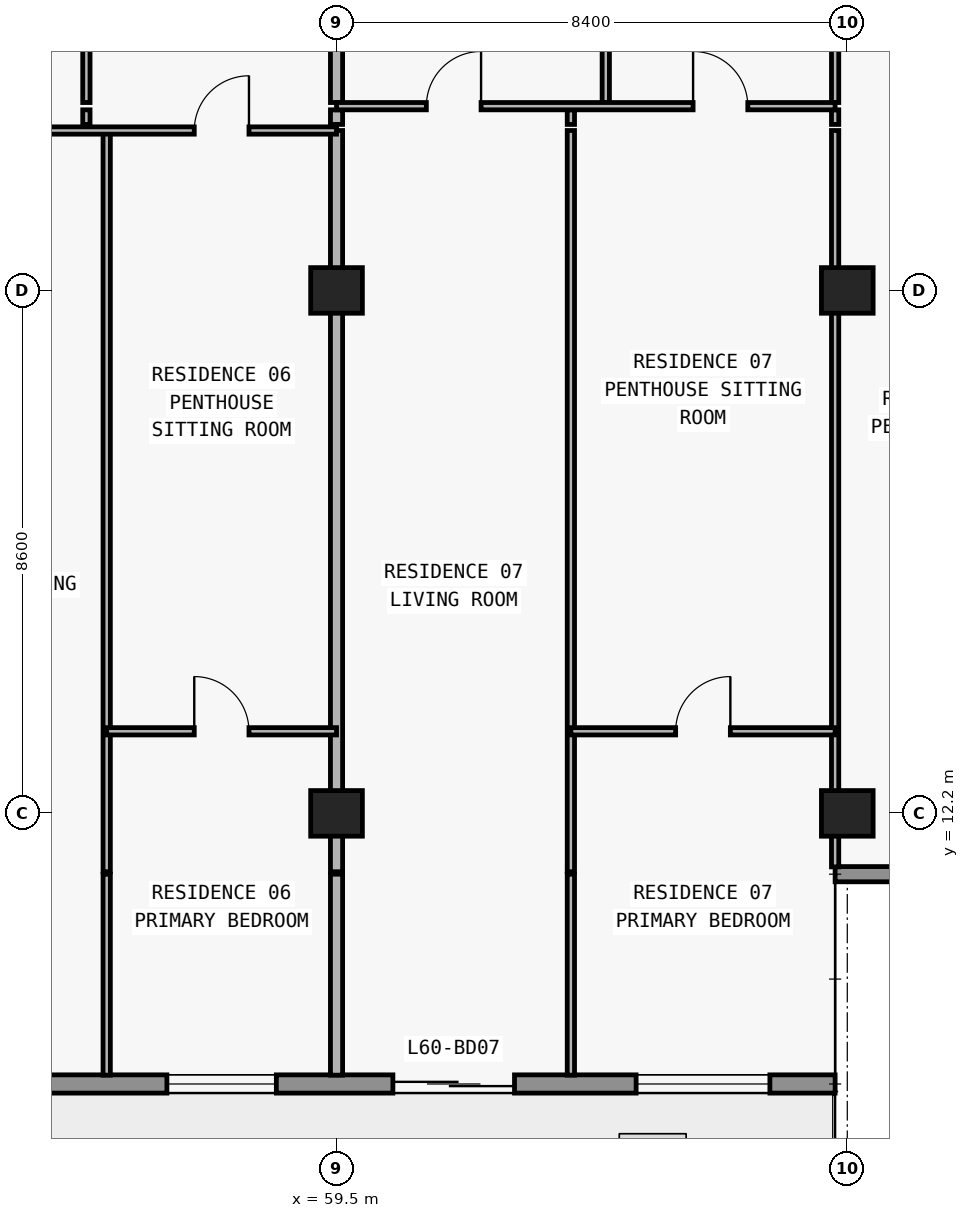
"""IFC4 building model, lengths in metres.
Left out: names, types, materials, properties, quantities, classifications, styles, units other than length and angle.
Written with IfcOpenShell. Run it as: python <this file> out.ifc"""

import sys

from ifc_helpers import new_model, si_unit, direction, frame, frame_2d, origin, origin_2d, place, context, subcontext, project, spatial, rectangle, extrude, element, fill, save


model = new_model("IFC4")
c1 = context("Model", 3, precision=1e-05, world=origin(), true_north=direction((0.0, 1.0)))
c2 = subcontext(c1, "Body", "Model", "MODEL_VIEW")
j1 = project(units=[si_unit("LENGTHUNIT", "METRE"), si_unit("PLANEANGLEUNIT", "RADIAN")], contexts=[c1])
p1 = place(None, origin())
s1 = spatial("IfcSite", under=j1, at=p1, CompositionType="ELEMENT")
p2 = place(p1, origin())
s2 = spatial("IfcBuilding", under=s1, at=p2, CompositionType="ELEMENT")
p3 = place(p2, frame((0.0, 0.0, 214.8)))
s3 = spatial("IfcBuildingStorey", under=s2, at=p3, CompositionType="ELEMENT", Elevation=214.8)
for number, where, z_axis, x_axis in (
    (1, (59.5, 12.2, 0.0), (0.0, 0.0, 1.0), (1.0, 0.0, 0.0)),
    (2, (67.9, 12.2, 0.0), (0.0, 0.0, 1.0), (1.0, 0.0, 0.0)),
    (3, (59.5, 20.8, 0.0), (0.0, 0.0, 1.0), (1.0, 0.0, 0.0)),
    (4, (67.9, 20.8, 0.0), (0.0, 0.0, 1.0), (1.0, 0.0, 0.0)),
):
    element("IfcColumn", number, at=place(p3, frame(where, z_axis=z_axis, x_axis=x_axis)), inside=s3, PredefinedType="COLUMN", context=c2, shape_type="SweptSolid", body=[
        extrude(rectangle(XDim=0.85, YDim=0.75, at=origin_2d()), origin(), (0.0, 0.0, 1.0), 3.05),
    ])
p4 = place(p3, frame((67.7, 7.75, 0.0), z_axis=(0.0, 0.0, 1.0), x_axis=(-1.0, 0.0, 0.0)))
e5 = element("IfcWall", 5, at=p4, inside=s3, PredefinedType="STANDARD", context=c2, shape_type="SweptSolid", body=[
    extrude(rectangle(XDim=57.6, YDim=0.3, at=frame_2d((28.8, 0.0))), origin(), (0.0, 0.0, 1.0), 3.05),
])
p5 = place(p4, frame((54.673, 0.0, 0.0)))
e6 = element("IfcOpeningElement", 6, at=p5, cuts=e5, PredefinedType="OPENING", context=c2, shape_type="SweptSolid", body=[
    extrude(rectangle(XDim=2.0, YDim=2.3, at=frame_2d((1.0, 1.15))), frame((0.0, 0.16, 0.0), z_axis=(0.0, -1.0, 0.0), x_axis=(1.0, 0.0, 0.0)), (0.0, 0.0, 1.0), 0.32),
])
p6 = place(p4, frame((50.473, 0.0, 0.85)))
e7 = element("IfcOpeningElement", 7, at=p6, cuts=e5, PredefinedType="OPENING", context=c2, shape_type="SweptSolid", body=[
    extrude(rectangle(XDim=2.2, YDim=1.55, at=frame_2d((1.1, 0.775))), frame((0.0, 0.16, 0.0), z_axis=(0.0, -1.0, 0.0), x_axis=(1.0, 0.0, 0.0)), (0.0, 0.0, 1.0), 0.32),
])
p7 = place(p4, frame((46.09, 0.0, 0.0)))
e8 = element("IfcOpeningElement", 8, at=p7, cuts=e5, PredefinedType="OPENING", context=c2, shape_type="SweptSolid", body=[
    extrude(rectangle(XDim=2.0, YDim=2.3, at=frame_2d((1.0, 1.15))), frame((0.0, 0.16, 0.0), z_axis=(0.0, -1.0, 0.0), x_axis=(1.0, 0.0, 0.0)), (0.0, 0.0, 1.0), 0.32),
])
p8 = place(p4, frame((41.99, 0.0, 0.85)))
e9 = element("IfcOpeningElement", 9, at=p8, cuts=e5, PredefinedType="OPENING", context=c2, shape_type="SweptSolid", body=[
    extrude(rectangle(XDim=1.8, YDim=1.55, at=frame_2d((0.9, 0.775))), frame((0.0, 0.16, 0.0), z_axis=(0.0, -1.0, 0.0), x_axis=(1.0, 0.0, 0.0)), (0.0, 0.0, 1.0), 0.32),
])
p9 = place(p4, frame((38.026, 0.0, 0.0)))
e10 = element("IfcOpeningElement", 10, at=p9, cuts=e5, PredefinedType="OPENING", context=c2, shape_type="SweptSolid", body=[
    extrude(rectangle(XDim=2.0, YDim=2.3, at=frame_2d((1.0, 1.15))), frame((0.0, 0.16, 0.0), z_axis=(0.0, -1.0, 0.0), x_axis=(1.0, 0.0, 0.0)), (0.0, 0.0, 1.0), 0.32),
])
p10 = place(p4, frame((33.726, 0.0, 0.85)))
e11 = element("IfcOpeningElement", 11, at=p10, cuts=e5, PredefinedType="OPENING", context=c2, shape_type="SweptSolid", body=[
    extrude(rectangle(XDim=2.2, YDim=1.55, at=frame_2d((1.1, 0.775))), frame((0.0, 0.16, 0.0), z_axis=(0.0, -1.0, 0.0), x_axis=(1.0, 0.0, 0.0)), (0.0, 0.0, 1.0), 0.32),
])
p11 = place(p4, frame((29.51, 0.0, 0.0)))
e12 = element("IfcOpeningElement", 12, at=p11, cuts=e5, PredefinedType="OPENING", context=c2, shape_type="SweptSolid", body=[
    extrude(rectangle(XDim=2.0, YDim=2.3, at=frame_2d((1.0, 1.15))), frame((0.0, 0.16, 0.0), z_axis=(0.0, -1.0, 0.0), x_axis=(1.0, 0.0, 0.0)), (0.0, 0.0, 1.0), 0.32),
])
p12 = place(p4, frame((25.81, 0.0, 0.85)))
e13 = element("IfcOpeningElement", 13, at=p12, cuts=e5, PredefinedType="OPENING", context=c2, shape_type="SweptSolid", body=[
    extrude(rectangle(XDim=1.8, YDim=1.55, at=frame_2d((0.9, 0.775))), frame((0.0, 0.16, 0.0), z_axis=(0.0, -1.0, 0.0), x_axis=(1.0, 0.0, 0.0)), (0.0, 0.0, 1.0), 0.32),
])
p13 = place(p4, frame((22.026, 0.0, 0.0)))
e14 = element("IfcOpeningElement", 14, at=p13, cuts=e5, PredefinedType="OPENING", context=c2, shape_type="SweptSolid", body=[
    extrude(rectangle(XDim=2.0, YDim=2.3, at=frame_2d((1.0, 1.15))), frame((0.0, 0.16, 0.0), z_axis=(0.0, -1.0, 0.0), x_axis=(1.0, 0.0, 0.0)), (0.0, 0.0, 1.0), 0.32),
])
p14 = place(p4, frame((17.726, 0.0, 0.85)))
e15 = element("IfcOpeningElement", 15, at=p14, cuts=e5, PredefinedType="OPENING", context=c2, shape_type="SweptSolid", body=[
    extrude(rectangle(XDim=2.2, YDim=1.55, at=frame_2d((1.1, 0.775))), frame((0.0, 0.16, 0.0), z_axis=(0.0, -1.0, 0.0), x_axis=(1.0, 0.0, 0.0)), (0.0, 0.0, 1.0), 0.32),
])
p15 = place(p4, frame((13.29, 0.0, 0.0)))
e16 = element("IfcOpeningElement", 16, at=p15, cuts=e5, PredefinedType="OPENING", context=c2, shape_type="SweptSolid", body=[
    extrude(rectangle(XDim=2.0, YDim=2.3, at=frame_2d((1.0, 1.15))), frame((0.0, 0.16, 0.0), z_axis=(0.0, -1.0, 0.0), x_axis=(1.0, 0.0, 0.0)), (0.0, 0.0, 1.0), 0.32),
])
p16 = place(p4, frame((9.19, 0.0, 0.85)))
e17 = element("IfcOpeningElement", 17, at=p16, cuts=e5, PredefinedType="OPENING", context=c2, shape_type="SweptSolid", body=[
    extrude(rectangle(XDim=1.8, YDim=1.55, at=frame_2d((0.9, 0.775))), frame((0.0, 0.16, 0.0), z_axis=(0.0, -1.0, 0.0), x_axis=(1.0, 0.0, 0.0)), (0.0, 0.0, 1.0), 0.32),
])
p17 = place(p4, frame((5.273, 0.0, 0.0)))
e18 = element("IfcOpeningElement", 18, at=p17, cuts=e5, PredefinedType="OPENING", context=c2, shape_type="SweptSolid", body=[
    extrude(rectangle(XDim=2.0, YDim=2.3, at=frame_2d((1.0, 1.15))), frame((0.0, 0.16, 0.0), z_axis=(0.0, -1.0, 0.0), x_axis=(1.0, 0.0, 0.0)), (0.0, 0.0, 1.0), 0.32),
])
p18 = place(p4, frame((1.073, 0.0, 0.85)))
e19 = element("IfcOpeningElement", 19, at=p18, cuts=e5, PredefinedType="OPENING", context=c2, shape_type="SweptSolid", body=[
    extrude(rectangle(XDim=2.2, YDim=1.55, at=frame_2d((1.1, 0.775))), frame((0.0, 0.16, 0.0), z_axis=(0.0, -1.0, 0.0), x_axis=(1.0, 0.0, 0.0)), (0.0, 0.0, 1.0), 0.32),
])
p19 = place(p3, frame((67.7, 11.2, 0.0), z_axis=(0.0, 0.0, 1.0), x_axis=(1.0, 0.0, 0.0)))
e20 = element("IfcWall", 20, at=p19, inside=s3, PredefinedType="ELEMENTEDWALL", context=c2, shape_type="SweptSolid", body=[
    extrude(rectangle(XDim=3.85, YDim=0.25, at=frame_2d((1.925, 0.0))), origin(), (0.0, 0.0, 1.0), 3.05),
])
p20 = place(p3, frame((55.386, 23.53, 0.0), z_axis=(0.0, 0.0, 1.0), x_axis=(0.0, 1.0, 0.0)))
e21 = element("IfcWall", 21, at=p20, inside=s3, PredefinedType="PARTITIONING", context=c2, shape_type="SweptSolid", body=[
    extrude(rectangle(XDim=0.24, YDim=0.12, at=frame_2d((0.12, 0.0))), origin(), (0.0, 0.0, 1.0), 3.05),
])
p21 = place(p3, frame((55.386, 23.89, 0.0), z_axis=(0.0, 0.0, 1.0), x_axis=(0.0, 1.0, 0.0)))
e22 = element("IfcWall", 22, at=p21, inside=s3, PredefinedType="PARTITIONING", context=c2, shape_type="SweptSolid", body=[
    extrude(rectangle(XDim=4.69, YDim=0.12, at=frame_2d((2.345, 0.0))), origin(), (0.0, 0.0, 1.0), 3.05),
])
p22 = place(p21, frame((1.895, 0.0, 0.0)))
e23 = element("IfcOpeningElement", 23, at=p22, cuts=e22, PredefinedType="OPENING", context=c2, shape_type="SweptSolid", body=[
    extrude(rectangle(XDim=0.9, YDim=2.15, at=frame_2d((0.45, 1.075))), frame((0.0, 0.07, 0.0), z_axis=(0.0, -1.0, 0.0), x_axis=(1.0, 0.0, 0.0)), (0.0, 0.0, 1.0), 0.14),
])
p23 = place(p3, frame((55.72, 7.895, 0.0), z_axis=(0.0, 0.0, 1.0), x_axis=(0.0, 1.0, 0.0)))
e24 = element("IfcWall", 24, at=p23, inside=s3, PredefinedType="PARTITIONING", context=c2, shape_type="SweptSolid", body=[
    extrude(rectangle(XDim=3.305, YDim=0.12, at=frame_2d((1.652, 0.0))), origin(), (0.0, 0.0, 1.0), 3.05),
])
p24 = place(p3, frame((55.72, 11.24, 0.0), z_axis=(0.0, 0.0, 1.0), x_axis=(0.0, 1.0, 0.0)))
e25 = element("IfcWall", 25, at=p24, inside=s3, PredefinedType="PARTITIONING", context=c2, shape_type="SweptSolid", body=[
    extrude(rectangle(XDim=12.19, YDim=0.12, at=frame_2d((6.095, 0.0))), origin(), (0.0, 0.0, 1.0), 3.05),
])
p25 = place(p3, frame((59.5, 7.895, 0.0), z_axis=(0.0, 0.0, 1.0), x_axis=(0.0, 1.0, 0.0)))
e26 = element("IfcWall", 26, at=p25, inside=s3, PredefinedType="PARTITIONING", context=c2, shape_type="SweptSolid", body=[
    extrude(rectangle(XDim=3.305, YDim=0.2, at=frame_2d((1.652, 0.0))), origin(), (0.0, 0.0, 1.0), 3.05),
])
p26 = place(p3, frame((59.5, 11.24, 0.0), z_axis=(0.0, 0.0, 1.0), x_axis=(0.0, 1.0, 0.0)))
e27 = element("IfcWall", 27, at=p26, inside=s3, PredefinedType="PARTITIONING", context=c2, shape_type="SweptSolid", body=[
    extrude(rectangle(XDim=12.19, YDim=0.2, at=frame_2d((6.095, 0.0))), origin(), (0.0, 0.0, 1.0), 2.263),
])
p27 = place(p3, frame((59.5, 23.53, 0.0), z_axis=(0.0, 0.0, 1.0), x_axis=(0.0, 1.0, 0.0)))
e28 = element("IfcWall", 28, at=p27, inside=s3, PredefinedType="PARTITIONING", context=c2, shape_type="SweptSolid", body=[
    extrude(rectangle(XDim=0.24, YDim=0.2, at=frame_2d((0.12, 0.0))), origin(), (0.0, 0.0, 1.0), 2.263),
])
p28 = place(p3, frame((59.5, 23.89, 0.0), z_axis=(0.0, 0.0, 1.0), x_axis=(0.0, 1.0, 0.0)))
e29 = element("IfcWall", 29, at=p28, inside=s3, PredefinedType="PARTITIONING", context=c2, shape_type="SweptSolid", body=[
    extrude(rectangle(XDim=4.69, YDim=0.2, at=frame_2d((2.345, 0.0))), origin(), (0.0, 0.0, 1.0), 2.263),
])
p29 = place(p3, frame((63.354, 7.895, 0.0), z_axis=(0.0, 0.0, 1.0), x_axis=(0.0, 1.0, 0.0)))
e30 = element("IfcWall", 30, at=p29, inside=s3, PredefinedType="PARTITIONING", context=c2, shape_type="SweptSolid", body=[
    extrude(rectangle(XDim=3.305, YDim=0.12, at=frame_2d((1.652, 0.0))), origin(), (0.0, 0.0, 1.0), 3.05),
])
p30 = place(p3, frame((63.354, 11.24, 0.0), z_axis=(0.0, 0.0, 1.0), x_axis=(0.0, 1.0, 0.0)))
e31 = element("IfcWall", 31, at=p30, inside=s3, PredefinedType="PARTITIONING", context=c2, shape_type="SweptSolid", body=[
    extrude(rectangle(XDim=12.19, YDim=0.12, at=frame_2d((6.095, 0.0))), origin(), (0.0, 0.0, 1.0), 3.05),
])
p31 = place(p3, frame((63.354, 23.53, 0.0), z_axis=(0.0, 0.0, 1.0), x_axis=(0.0, 1.0, 0.0)))
e32 = element("IfcWall", 32, at=p31, inside=s3, PredefinedType="PARTITIONING", context=c2, shape_type="SweptSolid", body=[
    extrude(rectangle(XDim=0.24, YDim=0.12, at=frame_2d((0.12, 0.0))), origin(), (0.0, 0.0, 1.0), 3.05),
])
p32 = place(p3, frame((63.928, 23.89, 0.0), z_axis=(0.0, 0.0, 1.0), x_axis=(0.0, 1.0, 0.0)))
e33 = element("IfcWall", 33, at=p32, inside=s3, PredefinedType="PARTITIONING", context=c2, shape_type="SweptSolid", body=[
    extrude(rectangle(XDim=4.69, YDim=0.12, at=frame_2d((2.345, 0.0))), origin(), (0.0, 0.0, 1.0), 3.05),
])
p33 = place(p32, frame((1.895, 0.0, 0.0)))
e34 = element("IfcOpeningElement", 34, at=p33, cuts=e33, PredefinedType="OPENING", context=c2, shape_type="SweptSolid", body=[
    extrude(rectangle(XDim=0.9, YDim=2.15, at=frame_2d((0.45, 1.075))), frame((0.0, 0.07, 0.0), z_axis=(0.0, -1.0, 0.0), x_axis=(1.0, 0.0, 0.0)), (0.0, 0.0, 1.0), 0.14),
])
p34 = place(p3, frame((67.7, 11.32, 0.0), z_axis=(0.0, 0.0, 1.0), x_axis=(0.0, 1.0, 0.0)))
e35 = element("IfcWall", 35, at=p34, inside=s3, PredefinedType="PARTITIONING", context=c2, shape_type="SweptSolid", body=[
    extrude(rectangle(XDim=12.11, YDim=0.12, at=frame_2d((6.055, 0.0))), origin(), (0.0, 0.0, 1.0), 2.263),
])
p35 = place(p3, frame((67.7, 23.53, 0.0), z_axis=(0.0, 0.0, 1.0), x_axis=(0.0, 1.0, 0.0)))
e36 = element("IfcWall", 36, at=p35, inside=s3, PredefinedType="PARTITIONING", context=c2, shape_type="SweptSolid", body=[
    extrude(rectangle(XDim=0.24, YDim=0.12, at=frame_2d((0.12, 0.0))), origin(), (0.0, 0.0, 1.0), 2.263),
])
p36 = place(p3, frame((67.7, 23.89, 0.0), z_axis=(0.0, 0.0, 1.0), x_axis=(0.0, 1.0, 0.0)))
e37 = element("IfcWall", 37, at=p36, inside=s3, PredefinedType="PARTITIONING", context=c2, shape_type="SweptSolid", body=[
    extrude(rectangle(XDim=4.69, YDim=0.12, at=frame_2d((2.345, 0.0))), origin(), (0.0, 0.0, 1.0), 2.263),
])
p37 = place(p36, frame((1.895, 0.0, 0.0)))
e38 = element("IfcOpeningElement", 38, at=p37, cuts=e37, PredefinedType="OPENING", context=c2, shape_type="SweptSolid", body=[
    extrude(rectangle(XDim=0.9, YDim=2.15, at=frame_2d((0.45, 1.075))), frame((0.0, 0.07, 0.0), z_axis=(0.0, -1.0, 0.0), x_axis=(1.0, 0.0, 0.0)), (0.0, 0.0, 1.0), 0.14),
])
p38 = place(p3, frame((55.72, 13.55, 0.0), z_axis=(0.0, 0.0, 1.0), x_axis=(1.0, 0.0, 0.0)))
e39 = element("IfcWall", 39, at=p38, inside=s3, PredefinedType="PARTITIONING", context=c2, shape_type="SweptSolid", body=[
    extrude(rectangle(XDim=3.78, YDim=0.12, at=frame_2d((1.89, 0.0))), origin(), (0.0, 0.0, 1.0), 3.05),
])
p39 = place(p38, frame((1.44, 0.0, 0.0)))
e40 = element("IfcOpeningElement", 40, at=p39, cuts=e39, PredefinedType="OPENING", context=c2, shape_type="SweptSolid", body=[
    extrude(rectangle(XDim=0.9, YDim=2.15, at=frame_2d((0.45, 1.075))), frame((0.0, 0.07, 0.0), z_axis=(0.0, -1.0, 0.0), x_axis=(1.0, 0.0, 0.0)), (0.0, 0.0, 1.0), 0.14),
])
p40 = place(p3, frame((63.354, 13.55, 0.0), z_axis=(0.0, 0.0, 1.0), x_axis=(1.0, 0.0, 0.0)))
e41 = element("IfcWall", 41, at=p40, inside=s3, PredefinedType="PARTITIONING", context=c2, shape_type="SweptSolid", body=[
    extrude(rectangle(XDim=4.346, YDim=0.12, at=frame_2d((2.173, 0.0))), origin(), (0.0, 0.0, 1.0), 3.05),
])
p41 = place(p40, frame((1.723, 0.0, 0.0)))
e42 = element("IfcOpeningElement", 42, at=p41, cuts=e41, PredefinedType="OPENING", context=c2, shape_type="SweptSolid", body=[
    extrude(rectangle(XDim=0.9, YDim=2.15, at=frame_2d((0.45, 1.075))), frame((0.0, 0.07, 0.0), z_axis=(0.0, -1.0, 0.0), x_axis=(1.0, 0.0, 0.0)), (0.0, 0.0, 1.0), 0.14),
])
p42 = place(p3, frame((51.32, 23.43, 0.0), z_axis=(0.0, 0.0, 1.0), x_axis=(1.0, 0.0, 0.0)))
e43 = element("IfcWall", 43, at=p42, inside=s3, PredefinedType="PARTITIONING", context=c2, shape_type="SweptSolid", body=[
    extrude(rectangle(XDim=8.18, YDim=0.12, at=frame_2d((4.09, 0.0))), origin(), (0.0, 0.0, 1.0), 3.05),
])
p43 = place(p42, frame((1.583, 0.0, 0.0)))
e44 = element("IfcOpeningElement", 44, at=p43, cuts=e43, PredefinedType="OPENING", context=c2, shape_type="SweptSolid", body=[
    extrude(rectangle(XDim=0.9, YDim=2.15, at=frame_2d((0.45, 1.075))), frame((0.0, 0.07, 0.0), z_axis=(0.0, -1.0, 0.0), x_axis=(1.0, 0.0, 0.0)), (0.0, 0.0, 1.0), 0.14),
])
p44 = place(p42, frame((5.84, 0.0, 0.0)))
e45 = element("IfcOpeningElement", 45, at=p44, cuts=e43, PredefinedType="OPENING", context=c2, shape_type="SweptSolid", body=[
    extrude(rectangle(XDim=0.9, YDim=2.15, at=frame_2d((0.45, 1.075))), frame((0.0, 0.07, 0.0), z_axis=(0.0, -1.0, 0.0), x_axis=(1.0, 0.0, 0.0)), (0.0, 0.0, 1.0), 0.14),
])
p45 = place(p3, frame((59.5, 23.83, 0.0), z_axis=(0.0, 0.0, 1.0), x_axis=(1.0, 0.0, 0.0)))
e46 = element("IfcWall", 46, at=p45, inside=s3, PredefinedType="PARTITIONING", context=c2, shape_type="SweptSolid", body=[
    extrude(rectangle(XDim=8.2, YDim=0.12, at=frame_2d((4.1, 0.0))), origin(), (0.0, 0.0, 1.0), 3.05),
])
p46 = place(p45, frame((1.477, 0.0, 0.0)))
e47 = element("IfcOpeningElement", 47, at=p46, cuts=e46, PredefinedType="OPENING", context=c2, shape_type="SweptSolid", body=[
    extrude(rectangle(XDim=0.9, YDim=2.15, at=frame_2d((0.45, 1.075))), frame((0.0, 0.07, 0.0), z_axis=(0.0, -1.0, 0.0), x_axis=(1.0, 0.0, 0.0)), (0.0, 0.0, 1.0), 0.14),
])
p47 = place(p45, frame((5.864, 0.0, 0.0)))
e48 = element("IfcOpeningElement", 48, at=p47, cuts=e46, PredefinedType="OPENING", context=c2, shape_type="SweptSolid", body=[
    extrude(rectangle(XDim=0.9, YDim=2.15, at=frame_2d((0.45, 1.075))), frame((0.0, 0.07, 0.0), z_axis=(0.0, -1.0, 0.0), x_axis=(1.0, 0.0, 0.0)), (0.0, 0.0, 1.0), 0.14),
])
p48 = place(p16, origin())
e49 = element("IfcWindow", 49, at=p48, inside=s3, PartitioningType="SINGLE_PANEL", PredefinedType="WINDOW", context=c2, shape_type="SweptSolid", body=[
    extrude(rectangle(XDim=1.8, YDim=1.55, at=frame_2d((0.9, 0.775))), frame((0.0, 0.03, 0.0), z_axis=(0.0, -1.0, 0.0), x_axis=(1.0, 0.0, 0.0)), (0.0, 0.0, 1.0), 0.06),
])
fill(e17, e49)
p49 = place(p17, origin())
e50 = element("IfcDoor", 50, at=p49, inside=s3, OperationType="DOUBLE_DOOR_SLIDING", PredefinedType="DOOR", context=c2, shape_type="SweptSolid", body=[
    extrude(rectangle(XDim=2.0, YDim=2.3, at=frame_2d((1.0, 1.15))), frame((0.0, 0.025, 0.0), z_axis=(0.0, -1.0, 0.0), x_axis=(1.0, 0.0, 0.0)), (0.0, 0.0, 1.0), 0.05),
])
fill(e18, e50)
p50 = place(p18, origin())
e51 = element("IfcWindow", 51, at=p50, inside=s3, PartitioningType="SINGLE_PANEL", PredefinedType="WINDOW", context=c2, shape_type="SweptSolid", body=[
    extrude(rectangle(XDim=2.2, YDim=1.55, at=frame_2d((1.1, 0.775))), frame((0.0, 0.03, 0.0), z_axis=(0.0, -1.0, 0.0), x_axis=(1.0, 0.0, 0.0)), (0.0, 0.0, 1.0), 0.06),
])
fill(e19, e51)
p51 = place(p44, origin())
e52 = element("IfcDoor", 52, at=p51, inside=s3, OperationType="SINGLE_SWING_RIGHT", PredefinedType="DOOR", context=c2, shape_type="SweptSolid", body=[
    extrude(rectangle(XDim=0.9, YDim=2.15, at=frame_2d((0.45, 1.075))), frame((0.0, 0.025, 0.0), z_axis=(0.0, -1.0, 0.0), x_axis=(1.0, 0.0, 0.0)), (0.0, 0.0, 1.0), 0.05),
])
fill(e45, e52)
p52 = place(p39, origin())
e53 = element("IfcDoor", 53, at=p52, inside=s3, OperationType="SINGLE_SWING_LEFT", PredefinedType="DOOR", context=c2, shape_type="SweptSolid", body=[
    extrude(rectangle(XDim=0.9, YDim=2.15, at=frame_2d((0.45, 1.075))), frame((0.0, 0.025, 0.0), z_axis=(0.0, -1.0, 0.0), x_axis=(1.0, 0.0, 0.0)), (0.0, 0.0, 1.0), 0.05),
])
fill(e40, e53)
p53 = place(p46, origin())
e54 = element("IfcDoor", 54, at=p53, inside=s3, OperationType="SINGLE_SWING_RIGHT", PredefinedType="DOOR", context=c2, shape_type="SweptSolid", body=[
    extrude(rectangle(XDim=0.9, YDim=2.15, at=frame_2d((0.45, 1.075))), frame((0.0, 0.025, 0.0), z_axis=(0.0, -1.0, 0.0), x_axis=(1.0, 0.0, 0.0)), (0.0, 0.0, 1.0), 0.05),
])
fill(e47, e54)
p54 = place(p47, origin())
e55 = element("IfcDoor", 55, at=p54, inside=s3, OperationType="SINGLE_SWING_LEFT", PredefinedType="DOOR", context=c2, shape_type="SweptSolid", body=[
    extrude(rectangle(XDim=0.9, YDim=2.15, at=frame_2d((0.45, 1.075))), frame((0.0, 0.025, 0.0), z_axis=(0.0, -1.0, 0.0), x_axis=(1.0, 0.0, 0.0)), (0.0, 0.0, 1.0), 0.05),
])
fill(e48, e55)
p55 = place(p41, origin())
e56 = element("IfcDoor", 56, at=p55, inside=s3, OperationType="SINGLE_SWING_RIGHT", PredefinedType="DOOR", context=c2, shape_type="SweptSolid", body=[
    extrude(rectangle(XDim=0.9, YDim=2.15, at=frame_2d((0.45, 1.075))), frame((0.0, 0.025, 0.0), z_axis=(0.0, -1.0, 0.0), x_axis=(1.0, 0.0, 0.0)), (0.0, 0.0, 1.0), 0.05),
])
fill(e42, e56)
save(model, sys.argv[1])
